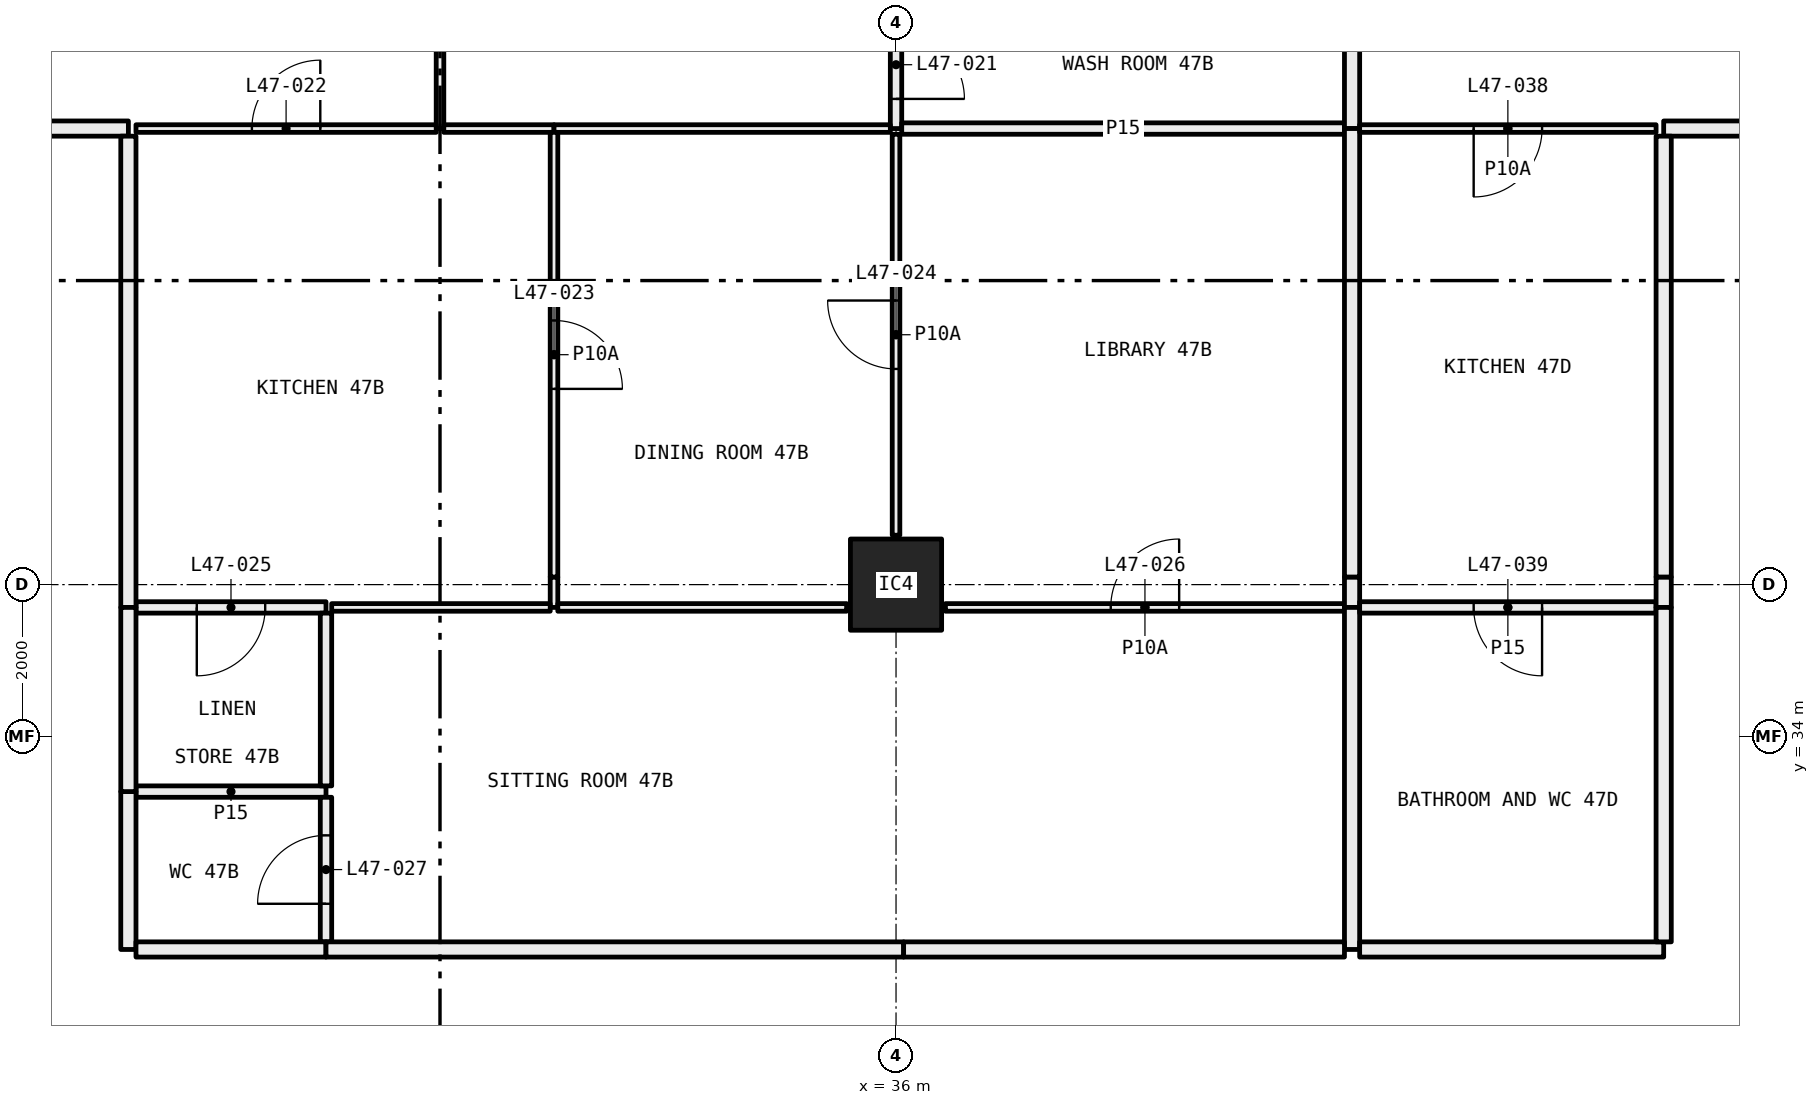
"""IFC4 building model, lengths in metres.
Left out: names, types, materials, properties, quantities, classifications, styles, units other than length and angle.
Written with IfcOpenShell. Run it as: python <this file> out.ifc"""

import sys

from ifc_helpers import new_model, si_unit, direction, frame, frame_2d, origin, origin_2d, place, context, subcontext, project, spatial, rectangle, hollow_rectangle, extrude, element, fill, save


model = new_model("IFC4")
c1 = context("Model", 3, precision=1e-05, world=origin(), true_north=direction((0.0, 1.0)))
c2 = subcontext(c1, "Body", "Model", "MODEL_VIEW")
j1 = project(units=[si_unit("LENGTHUNIT", "METRE"), si_unit("PLANEANGLEUNIT", "RADIAN")], contexts=[c1])
p1 = place(None, origin())
s1 = spatial("IfcSite", under=j1, at=p1, CompositionType="ELEMENT")
p2 = place(p1, origin())
s2 = spatial("IfcBuilding", under=s1, at=p2, CompositionType="ELEMENT")
p3 = place(p2, frame((0.0, 0.0, 178.95)))
s3 = spatial("IfcBuildingStorey", under=s2, at=p3, CompositionType="ELEMENT", Elevation=178.95)
p4 = place(p3, frame((36.0, 36.0, 0.0), z_axis=(0.0, 0.0, 1.0), x_axis=(1.0, 0.0, 0.0)))
e1 = element("IfcColumn", 1, at=p4, inside=s3, PredefinedType="COLUMN", context=c2, shape_type="SweptSolid", body=[
    extrude(hollow_rectangle(XDim=1.2, YDim=1.2, WallThickness=0.05, at=origin_2d()), origin(), (0.0, 0.0, 1.0), 3.05),
])
p5 = place(p3, frame((30.0, 42.0, 0.0), z_axis=(0.0, 0.0, 1.0), x_axis=(0.0, 1.0, 0.0)))
e2 = element("IfcWall", 2, at=p5, inside=s3, PredefinedType="PARTITIONING", context=c2, shape_type="SweptSolid", body=[
    extrude(rectangle(XDim=5.28, YDim=0.1, at=frame_2d((2.64, 0.0))), origin(), (0.0, 0.0, 1.0), 3.05),
])
p6 = place(p5, frame((2.19, 0.0, 0.0)))
e3 = element("IfcOpeningElement", 3, at=p6, cuts=e2, PredefinedType="OPENING", context=c2, shape_type="SweptSolid", body=[
    extrude(rectangle(XDim=0.9, YDim=2.1, at=frame_2d((0.45, 1.05))), frame((0.0, 0.06, 0.0), z_axis=(0.0, -1.0, 0.0), x_axis=(1.0, 0.0, 0.0)), (0.0, 0.0, 1.0), 0.12),
])
p7 = place(p3, frame((26.0, 42.0, 0.0), z_axis=(0.0, 0.0, 1.0), x_axis=(1.0, 0.0, 0.0)))
e4 = element("IfcWall", 4, at=p7, inside=s3, PredefinedType="PARTITIONING", context=c2, shape_type="SweptSolid", body=[
    extrude(rectangle(XDim=3.95, YDim=0.1, at=frame_2d((1.975, 0.0))), origin(), (0.0, 0.0, 1.0), 3.05),
])
p8 = place(p7, frame((1.525, 0.0, 0.0)))
e5 = element("IfcOpeningElement", 5, at=p8, cuts=e4, PredefinedType="OPENING", context=c2, shape_type="SweptSolid", body=[
    extrude(rectangle(XDim=0.9, YDim=2.1, at=frame_2d((0.45, 1.05))), frame((0.0, 0.06, 0.0), z_axis=(0.0, -1.0, 0.0), x_axis=(1.0, 0.0, 0.0)), (0.0, 0.0, 1.0), 0.12),
])
p9 = place(p3, frame((24.0, 42.0, 0.0), z_axis=(0.0, 0.0, 1.0), x_axis=(1.0, 0.0, 0.0)))
e6 = element("IfcWall", 6, at=p9, inside=s3, PredefinedType="PARTITIONING", context=c2, shape_type="SweptSolid", body=[
    extrude(rectangle(XDim=1.9, YDim=0.2, at=frame_2d((0.95, 0.0))), origin(), (0.0, 0.0, 1.0), 3.05),
])
p10 = place(p3, frame((36.0, 42.0, 0.0), z_axis=(0.0, 0.0, 1.0), x_axis=(0.0, 1.0, 0.0)))
e7 = element("IfcWall", 7, at=p10, inside=s3, PredefinedType="PARTITIONING", context=c2, shape_type="SweptSolid", body=[
    extrude(rectangle(XDim=1.68, YDim=0.15, at=frame_2d((0.84, 0.0))), origin(), (0.0, 0.0, 1.0), 2.45),
])
p11 = place(p10, frame((0.39, 0.0, 0.0)))
e8 = element("IfcOpeningElement", 8, at=p11, cuts=e7, PredefinedType="OPENING", context=c2, shape_type="SweptSolid", body=[
    extrude(rectangle(XDim=0.9, YDim=2.1, at=frame_2d((0.45, 1.05))), frame((0.0, 0.085, 0.0), z_axis=(0.0, -1.0, 0.0), x_axis=(1.0, 0.0, 0.0)), (0.0, 0.0, 1.0), 0.17),
])
p12 = place(p3, frame((30.05, 42.0, 0.0), z_axis=(0.0, 0.0, 1.0), x_axis=(1.0, 0.0, 0.0)))
e9 = element("IfcWall", 9, at=p12, inside=s3, PredefinedType="PARTITIONING", context=c2, shape_type="SweptSolid", body=[
    extrude(rectangle(XDim=1.45, YDim=0.1, at=frame_2d((0.725, 0.0))), origin(), (0.0, 0.0, 1.0), 3.05),
])
p13 = place(p3, frame((31.5, 42.0, 0.0), z_axis=(0.0, 0.0, 1.0), x_axis=(1.0, 0.0, 0.0)))
e10 = element("IfcWall", 10, at=p13, inside=s3, PredefinedType="PARTITIONING", context=c2, shape_type="SweptSolid", body=[
    extrude(rectangle(XDim=4.425, YDim=0.1, at=frame_2d((2.212, 0.0))), origin(), (0.0, 0.0, 1.0), 2.45),
])
p14 = place(p3, frame((36.075, 42.0, 0.0), z_axis=(0.0, 0.0, 1.0), x_axis=(1.0, 0.0, 0.0)))
e11 = element("IfcWall", 11, at=p14, inside=s3, PredefinedType="PARTITIONING", context=c2, shape_type="SweptSolid", body=[
    extrude(rectangle(XDim=5.825, YDim=0.15, at=frame_2d((2.913, 0.0))), origin(), (0.0, 0.0, 1.0), 2.45),
])
p15 = place(p3, frame((42.0, 42.0, 0.0), z_axis=(0.0, 0.0, 1.0), x_axis=(0.0, 1.0, 0.0)))
e12 = element("IfcWall", 12, at=p15, inside=s3, PredefinedType="PARTITIONING", context=c2, shape_type="SweptSolid", body=[
    extrude(rectangle(XDim=1.68, YDim=0.2, at=frame_2d((0.84, 0.0))), origin(), (0.0, 0.0, 1.0), 3.05),
])
p16 = place(p3, frame((31.5, 35.7, 0.0), z_axis=(0.0, 0.0, 1.0), x_axis=(0.0, 1.0, 0.0)))
e13 = element("IfcWall", 13, at=p16, inside=s3, PredefinedType="PARTITIONING", context=c2, shape_type="SweptSolid", body=[
    extrude(rectangle(XDim=0.4, YDim=0.1, at=frame_2d((0.2, 0.0))), origin(), (0.0, 0.0, 1.0), 2.45),
])
p17 = place(p3, frame((31.5, 36.1, 0.0), z_axis=(0.0, 0.0, 1.0), x_axis=(0.0, 1.0, 0.0)))
e14 = element("IfcWall", 14, at=p17, inside=s3, PredefinedType="PARTITIONING", context=c2, shape_type="SweptSolid", body=[
    extrude(rectangle(XDim=5.85, YDim=0.1, at=frame_2d((2.925, 0.0))), origin(), (0.0, 0.0, 1.0), 3.05),
])
p18 = place(p17, frame((2.475, 0.0, 0.0)))
e15 = element("IfcOpeningElement", 15, at=p18, cuts=e14, PredefinedType="OPENING", context=c2, shape_type="SweptSolid", body=[
    extrude(rectangle(XDim=0.9, YDim=2.1, at=frame_2d((0.45, 1.05))), frame((0.0, 0.06, 0.0), z_axis=(0.0, -1.0, 0.0), x_axis=(1.0, 0.0, 0.0)), (0.0, 0.0, 1.0), 0.12),
])
p19 = place(p3, frame((26.0, 35.7, 0.0), z_axis=(0.0, 0.0, 1.0), x_axis=(1.0, 0.0, 0.0)))
e16 = element("IfcWall", 16, at=p19, inside=s3, PredefinedType="PARTITIONING", context=c2, shape_type="SweptSolid", body=[
    extrude(rectangle(XDim=2.5, YDim=0.15, at=frame_2d((1.25, 0.0))), origin(), (0.0, 0.0, 1.0), 3.05),
])
p20 = place(p19, frame((0.8, 0.0, 0.0)))
e17 = element("IfcOpeningElement", 17, at=p20, cuts=e16, PredefinedType="OPENING", context=c2, shape_type="SweptSolid", body=[
    extrude(rectangle(XDim=0.9, YDim=2.1, at=frame_2d((0.45, 1.05))), frame((0.0, 0.085, 0.0), z_axis=(0.0, -1.0, 0.0), x_axis=(1.0, 0.0, 0.0)), (0.0, 0.0, 1.0), 0.17),
])
p21 = place(p3, frame((28.575, 35.7, 0.0), z_axis=(0.0, 0.0, 1.0), x_axis=(1.0, 0.0, 0.0)))
e18 = element("IfcWall", 18, at=p21, inside=s3, PredefinedType="PARTITIONING", context=c2, shape_type="SweptSolid", body=[
    extrude(rectangle(XDim=2.875, YDim=0.1, at=frame_2d((1.438, 0.0))), origin(), (0.0, 0.0, 1.0), 3.05),
])
p22 = place(p3, frame((25.9, 41.9, 0.0), z_axis=(0.0, 0.0, 1.0), x_axis=(0.0, -1.0, 0.0)))
e19 = element("IfcWall", 19, at=p22, inside=s3, PredefinedType="PARTITIONING", context=c2, shape_type="SweptSolid", body=[
    extrude(rectangle(XDim=6.2, YDim=0.2, at=frame_2d((3.1, 0.0))), origin(), (0.0, 0.0, 1.0), 2.45),
])
p23 = place(p3, frame((36.0, 36.65, 0.0), z_axis=(0.0, 0.0, 1.0), x_axis=(0.0, 1.0, 0.0)))
e20 = element("IfcWall", 20, at=p23, inside=s3, PredefinedType="PARTITIONING", context=c2, shape_type="SweptSolid", body=[
    extrude(rectangle(XDim=5.275, YDim=0.1, at=frame_2d((2.638, 0.0))), origin(), (0.0, 0.0, 1.0), 2.45),
])
p24 = place(p23, frame((2.188, 0.0, 0.0)))
e21 = element("IfcOpeningElement", 21, at=p24, cuts=e20, PredefinedType="OPENING", context=c2, shape_type="SweptSolid", body=[
    extrude(rectangle(XDim=0.9, YDim=2.1, at=frame_2d((0.45, 1.05))), frame((0.0, 0.06, 0.0), z_axis=(0.0, -1.0, 0.0), x_axis=(1.0, 0.0, 0.0)), (0.0, 0.0, 1.0), 0.12),
])
p25 = place(p3, frame((31.55, 35.7, 0.0), z_axis=(0.0, 0.0, 1.0), x_axis=(1.0, 0.0, 0.0)))
e22 = element("IfcWall", 22, at=p25, inside=s3, PredefinedType="PARTITIONING", context=c2, shape_type="SweptSolid", body=[
    extrude(rectangle(XDim=3.8, YDim=0.1, at=frame_2d((1.9, 0.0))), origin(), (0.0, 0.0, 1.0), 3.05),
])
p26 = place(p3, frame((36.65, 35.7, 0.0), z_axis=(0.0, 0.0, 1.0), x_axis=(1.0, 0.0, 0.0)))
e23 = element("IfcWall", 23, at=p26, inside=s3, PredefinedType="PARTITIONING", context=c2, shape_type="SweptSolid", body=[
    extrude(rectangle(XDim=5.25, YDim=0.1, at=frame_2d((2.625, 0.0))), origin(), (0.0, 0.0, 1.0), 3.05),
])
p27 = place(p26, frame((2.175, 0.0, 0.0)))
e24 = element("IfcOpeningElement", 24, at=p27, cuts=e23, PredefinedType="OPENING", context=c2, shape_type="SweptSolid", body=[
    extrude(rectangle(XDim=0.9, YDim=2.1, at=frame_2d((0.45, 1.05))), frame((0.0, 0.06, 0.0), z_axis=(0.0, -1.0, 0.0), x_axis=(1.0, 0.0, 0.0)), (0.0, 0.0, 1.0), 0.12),
])
p28 = place(p3, frame((42.0, 35.7, 0.0), z_axis=(0.0, 0.0, 1.0), x_axis=(0.0, 1.0, 0.0)))
e25 = element("IfcWall", 25, at=p28, inside=s3, PredefinedType="PARTITIONING", context=c2, shape_type="SweptSolid", body=[
    extrude(rectangle(XDim=0.4, YDim=0.2, at=frame_2d((0.2, 0.0))), origin(), (0.0, 0.0, 1.0), 2.45),
])
p29 = place(p3, frame((42.0, 36.1, 0.0), z_axis=(0.0, 0.0, 1.0), x_axis=(0.0, 1.0, 0.0)))
e26 = element("IfcWall", 26, at=p29, inside=s3, PredefinedType="PARTITIONING", context=c2, shape_type="SweptSolid", body=[
    extrude(rectangle(XDim=5.9, YDim=0.2, at=frame_2d((2.95, 0.0))), origin(), (0.0, 0.0, 1.0), 3.05),
])
p30 = place(p3, frame((28.5, 33.277, 0.0), z_axis=(0.0, 0.0, 1.0), x_axis=(-1.0, 0.0, 0.0)))
e27 = element("IfcWall", 27, at=p30, inside=s3, PredefinedType="PARTITIONING", context=c2, shape_type="SweptSolid", body=[
    extrude(rectangle(XDim=2.5, YDim=0.15, at=frame_2d((1.25, 0.0))), origin(), (0.0, 0.0, 1.0), 3.05),
])
p31 = place(p3, frame((28.5, 31.3, 0.0), z_axis=(0.0, 0.0, 1.0), x_axis=(0.0, 1.0, 0.0)))
e28 = element("IfcWall", 28, at=p31, inside=s3, PredefinedType="PARTITIONING", context=c2, shape_type="SweptSolid", body=[
    extrude(rectangle(XDim=1.902, YDim=0.15, at=frame_2d((0.951, 0.0))), origin(), (0.0, 0.0, 1.0), 3.05),
])
p32 = place(p31, frame((0.501, 0.0, 0.0)))
e29 = element("IfcOpeningElement", 29, at=p32, cuts=e28, PredefinedType="OPENING", context=c2, shape_type="SweptSolid", body=[
    extrude(rectangle(XDim=0.9, YDim=2.1, at=frame_2d((0.45, 1.05))), frame((0.0, 0.085, 0.0), z_axis=(0.0, -1.0, 0.0), x_axis=(1.0, 0.0, 0.0)), (0.0, 0.0, 1.0), 0.17),
])
p33 = place(p3, frame((25.9, 33.277, 0.0), z_axis=(0.0, 0.0, 1.0), x_axis=(0.0, -1.0, 0.0)))
e30 = element("IfcWall", 30, at=p33, inside=s3, PredefinedType="PARTITIONING", context=c2, shape_type="SweptSolid", body=[
    extrude(rectangle(XDim=2.077, YDim=0.2, at=frame_2d((1.039, 0.0))), origin(), (0.0, 0.0, 1.0), 3.05),
])
p34 = place(p3, frame((26.0, 31.2, 0.0), z_axis=(0.0, 0.0, 1.0), x_axis=(1.0, 0.0, 0.0)))
e31 = element("IfcWall", 31, at=p34, inside=s3, PredefinedType="PARTITIONING", context=c2, shape_type="SweptSolid", body=[
    extrude(rectangle(XDim=2.5, YDim=0.2, at=frame_2d((1.25, 0.0))), origin(), (0.0, 0.0, 1.0), 3.05),
])
p35 = place(p3, frame((28.5, 33.352, 0.0), z_axis=(0.0, 0.0, 1.0), x_axis=(0.0, 1.0, 0.0)))
e32 = element("IfcWall", 32, at=p35, inside=s3, PredefinedType="PARTITIONING", context=c2, shape_type="SweptSolid", body=[
    extrude(rectangle(XDim=2.273, YDim=0.15, at=frame_2d((1.136, 0.0))), origin(), (0.0, 0.0, 1.0), 3.05),
])
p36 = place(p3, frame((25.9, 35.7, 0.0), z_axis=(0.0, 0.0, 1.0), x_axis=(0.0, -1.0, 0.0)))
e33 = element("IfcWall", 33, at=p36, inside=s3, PredefinedType="PARTITIONING", context=c2, shape_type="SweptSolid", body=[
    extrude(rectangle(XDim=2.423, YDim=0.2, at=frame_2d((1.211, 0.0))), origin(), (0.0, 0.0, 1.0), 3.05),
])
p37 = place(p3, frame((42.0, 31.2, 0.0), z_axis=(0.0, 0.0, 1.0), x_axis=(0.0, 1.0, 0.0)))
e34 = element("IfcWall", 34, at=p37, inside=s3, PredefinedType="PARTITIONING", context=c2, shape_type="SweptSolid", body=[
    extrude(rectangle(XDim=4.5, YDim=0.2, at=frame_2d((2.25, 0.0))), origin(), (0.0, 0.0, 1.0), 3.05),
])
p38 = place(p3, frame((28.5, 31.2, 0.0), z_axis=(0.0, 0.0, 1.0), x_axis=(1.0, 0.0, 0.0)))
e35 = element("IfcWall", 35, at=p38, inside=s3, PredefinedType="PARTITIONING", context=c2, shape_type="SweptSolid", body=[
    extrude(rectangle(XDim=7.6, YDim=0.2, at=frame_2d((3.8, 0.0))), origin(), (0.0, 0.0, 1.0), 2.45),
])
p39 = place(p3, frame((36.1, 31.2, 0.0), z_axis=(0.0, 0.0, 1.0), x_axis=(1.0, 0.0, 0.0)))
e36 = element("IfcWall", 36, at=p39, inside=s3, PredefinedType="PARTITIONING", context=c2, shape_type="SweptSolid", body=[
    extrude(rectangle(XDim=5.8, YDim=0.2, at=frame_2d((2.9, 0.0))), origin(), (0.0, 0.0, 1.0), 3.05),
])
p40 = place(p3, frame((42.1, 42.0, 0.0), z_axis=(0.0, 0.0, 1.0), x_axis=(1.0, 0.0, 0.0)))
e37 = element("IfcWall", 37, at=p40, inside=s3, PredefinedType="PARTITIONING", context=c2, shape_type="SweptSolid", body=[
    extrude(rectangle(XDim=3.9, YDim=0.1, at=frame_2d((1.95, 0.0))), origin(), (0.0, 0.0, 1.0), 3.05),
])
p41 = place(p40, frame((1.5, 0.0, 0.0)))
e38 = element("IfcOpeningElement", 38, at=p41, cuts=e37, PredefinedType="OPENING", context=c2, shape_type="SweptSolid", body=[
    extrude(rectangle(XDim=0.9, YDim=2.1, at=frame_2d((0.45, 1.05))), frame((0.0, 0.06, 0.0), z_axis=(0.0, -1.0, 0.0), x_axis=(1.0, 0.0, 0.0)), (0.0, 0.0, 1.0), 0.12),
])
p42 = place(p3, frame((46.1, 42.0, 0.0), z_axis=(0.0, 0.0, 1.0), x_axis=(1.0, 0.0, 0.0)))
e39 = element("IfcWall", 39, at=p42, inside=s3, PredefinedType="PARTITIONING", context=c2, shape_type="SweptSolid", body=[
    extrude(rectangle(XDim=1.9, YDim=0.2, at=frame_2d((0.95, 0.0))), origin(), (0.0, 0.0, 1.0), 3.05),
])
p43 = place(p3, frame((42.1, 35.7, 0.0), z_axis=(0.0, 0.0, 1.0), x_axis=(1.0, 0.0, 0.0)))
e40 = element("IfcWall", 40, at=p43, inside=s3, PredefinedType="PARTITIONING", context=c2, shape_type="SweptSolid", body=[
    extrude(rectangle(XDim=3.9, YDim=0.15, at=frame_2d((1.95, 0.0))), origin(), (0.0, 0.0, 1.0), 3.05),
])
p44 = place(p43, frame((1.5, 0.0, 0.0)))
e41 = element("IfcOpeningElement", 41, at=p44, cuts=e40, PredefinedType="OPENING", context=c2, shape_type="SweptSolid", body=[
    extrude(rectangle(XDim=0.9, YDim=2.1, at=frame_2d((0.45, 1.05))), frame((0.0, 0.085, 0.0), z_axis=(0.0, -1.0, 0.0), x_axis=(1.0, 0.0, 0.0)), (0.0, 0.0, 1.0), 0.17),
])
p45 = place(p3, frame((46.1, 35.7, 0.0), z_axis=(0.0, 0.0, 1.0), x_axis=(0.0, 1.0, 0.0)))
e42 = element("IfcWall", 42, at=p45, inside=s3, PredefinedType="PARTITIONING", context=c2, shape_type="SweptSolid", body=[
    extrude(rectangle(XDim=0.4, YDim=0.2, at=frame_2d((0.2, 0.0))), origin(), (0.0, 0.0, 1.0), 2.45),
])
p46 = place(p3, frame((46.1, 36.1, 0.0), z_axis=(0.0, 0.0, 1.0), x_axis=(0.0, 1.0, 0.0)))
e43 = element("IfcWall", 43, at=p46, inside=s3, PredefinedType="PARTITIONING", context=c2, shape_type="SweptSolid", body=[
    extrude(rectangle(XDim=5.8, YDim=0.2, at=frame_2d((2.9, 0.0))), origin(), (0.0, 0.0, 1.0), 3.05),
])
p47 = place(p3, frame((42.1, 31.2, 0.0), z_axis=(0.0, 0.0, 1.0), x_axis=(1.0, 0.0, 0.0)))
e44 = element("IfcWall", 44, at=p47, inside=s3, PredefinedType="PARTITIONING", context=c2, shape_type="SweptSolid", body=[
    extrude(rectangle(XDim=4.0, YDim=0.2, at=frame_2d((2.0, 0.0))), origin(), (0.0, 0.0, 1.0), 3.05),
])
p48 = place(p3, frame((46.1, 31.3, 0.0), z_axis=(0.0, 0.0, 1.0), x_axis=(0.0, 1.0, 0.0)))
e45 = element("IfcWall", 45, at=p48, inside=s3, PredefinedType="PARTITIONING", context=c2, shape_type="SweptSolid", body=[
    extrude(rectangle(XDim=4.4, YDim=0.2, at=frame_2d((2.2, 0.0))), origin(), (0.0, 0.0, 1.0), 3.05),
])
p49 = place(p11, frame((0.9, 0.0, 0.0), x_axis=(-1.0, 0.0, 0.0)))
e46 = element("IfcDoor", 46, at=p49, inside=s3, OperationType="SINGLE_SWING_LEFT", PredefinedType="DOOR", context=c2, shape_type="SweptSolid", body=[
    extrude(rectangle(XDim=0.9, YDim=2.1, at=frame_2d((0.45, 1.05))), frame((0.0, 0.025, 0.0), z_axis=(0.0, -1.0, 0.0), x_axis=(1.0, 0.0, 0.0)), (0.0, 0.0, 1.0), 0.05),
])
fill(e8, e46)
p50 = place(p8, origin())
e47 = element("IfcDoor", 47, at=p50, inside=s3, OperationType="SINGLE_SWING_LEFT", PredefinedType="DOOR", context=c2, shape_type="SweptSolid", body=[
    extrude(rectangle(XDim=0.9, YDim=2.1, at=frame_2d((0.45, 1.05))), frame((0.0, 0.025, 0.0), z_axis=(0.0, -1.0, 0.0), x_axis=(1.0, 0.0, 0.0)), (0.0, 0.0, 1.0), 0.05),
])
fill(e5, e47)
p51 = place(p18, frame((0.9, 0.0, 0.0), x_axis=(-1.0, 0.0, 0.0)))
e48 = element("IfcDoor", 48, at=p51, inside=s3, OperationType="SINGLE_SWING_LEFT", PredefinedType="DOOR", context=c2, shape_type="SweptSolid", body=[
    extrude(rectangle(XDim=0.9, YDim=2.1, at=frame_2d((0.45, 1.05))), frame((0.0, 0.025, 0.0), z_axis=(0.0, -1.0, 0.0), x_axis=(1.0, 0.0, 0.0)), (0.0, 0.0, 1.0), 0.05),
])
fill(e15, e48)
p52 = place(p24, origin())
e49 = element("IfcDoor", 49, at=p52, inside=s3, OperationType="SINGLE_SWING_LEFT", PredefinedType="DOOR", context=c2, shape_type="SweptSolid", body=[
    extrude(rectangle(XDim=0.9, YDim=2.1, at=frame_2d((0.45, 1.05))), frame((0.0, 0.025, 0.0), z_axis=(0.0, -1.0, 0.0), x_axis=(1.0, 0.0, 0.0)), (0.0, 0.0, 1.0), 0.05),
])
fill(e21, e49)
p53 = place(p20, frame((0.9, 0.0, 0.0), x_axis=(-1.0, 0.0, 0.0)))
e50 = element("IfcDoor", 50, at=p53, inside=s3, OperationType="SINGLE_SWING_LEFT", PredefinedType="DOOR", context=c2, shape_type="SweptSolid", body=[
    extrude(rectangle(XDim=0.9, YDim=2.1, at=frame_2d((0.45, 1.05))), frame((0.0, 0.025, 0.0), z_axis=(0.0, -1.0, 0.0), x_axis=(1.0, 0.0, 0.0)), (0.0, 0.0, 1.0), 0.05),
])
fill(e17, e50)
p54 = place(p27, origin())
e51 = element("IfcDoor", 51, at=p54, inside=s3, OperationType="SINGLE_SWING_LEFT", PredefinedType="DOOR", context=c2, shape_type="SweptSolid", body=[
    extrude(rectangle(XDim=0.9, YDim=2.1, at=frame_2d((0.45, 1.05))), frame((0.0, 0.025, 0.0), z_axis=(0.0, -1.0, 0.0), x_axis=(1.0, 0.0, 0.0)), (0.0, 0.0, 1.0), 0.05),
])
fill(e24, e51)
p55 = place(p32, origin())
e52 = element("IfcDoor", 52, at=p55, inside=s3, OperationType="SINGLE_SWING_RIGHT", PredefinedType="DOOR", context=c2, shape_type="SweptSolid", body=[
    extrude(rectangle(XDim=0.9, YDim=2.1, at=frame_2d((0.45, 1.05))), frame((0.0, 0.025, 0.0), z_axis=(0.0, -1.0, 0.0), x_axis=(1.0, 0.0, 0.0)), (0.0, 0.0, 1.0), 0.05),
])
fill(e29, e52)
p56 = place(p41, frame((0.9, 0.0, 0.0), x_axis=(-1.0, 0.0, 0.0)))
e53 = element("IfcDoor", 53, at=p56, inside=s3, OperationType="SINGLE_SWING_LEFT", PredefinedType="DOOR", context=c2, shape_type="SweptSolid", body=[
    extrude(rectangle(XDim=0.9, YDim=2.1, at=frame_2d((0.45, 1.05))), frame((0.0, 0.025, 0.0), z_axis=(0.0, -1.0, 0.0), x_axis=(1.0, 0.0, 0.0)), (0.0, 0.0, 1.0), 0.05),
])
fill(e38, e53)
p57 = place(p44, frame((0.9, 0.0, 0.0), x_axis=(-1.0, 0.0, 0.0)))
e54 = element("IfcDoor", 54, at=p57, inside=s3, OperationType="SINGLE_SWING_RIGHT", PredefinedType="DOOR", context=c2, shape_type="SweptSolid", body=[
    extrude(rectangle(XDim=0.9, YDim=2.1, at=frame_2d((0.45, 1.05))), frame((0.0, 0.025, 0.0), z_axis=(0.0, -1.0, 0.0), x_axis=(1.0, 0.0, 0.0)), (0.0, 0.0, 1.0), 0.05),
])
fill(e41, e54)
save(model, sys.argv[1])
